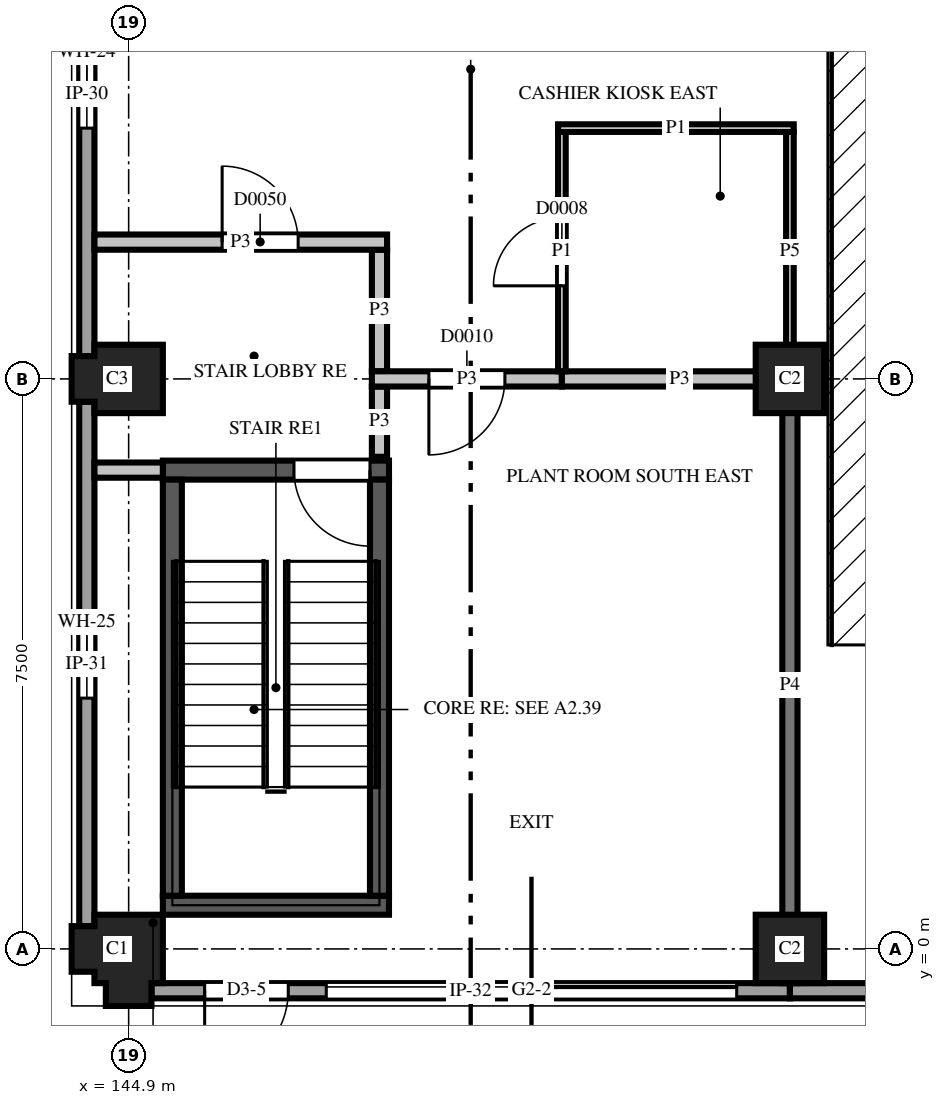
"""IFC4 building model, lengths in metres.
Left out: names, types, materials, properties, quantities, classifications, styles, units other than length and angle.
Written with IfcOpenShell. Run it as: python <this file> out.ifc"""

import sys

from ifc_helpers import new_model, si_unit, direction, frame, frame_2d, origin, place, context, subcontext, project, spatial, polyline, rectangle, outline, extrude, element, fill, save


model = new_model("IFC4")
c1 = context("Model", 3, precision=1e-05, world=origin(), true_north=direction((0.0, 1.0)))
c2 = subcontext(c1, "Body", "Model", "MODEL_VIEW")
j1 = project(units=[si_unit("LENGTHUNIT", "METRE"), si_unit("PLANEANGLEUNIT", "RADIAN")], contexts=[c1])
p1 = place(None, origin())
s1 = spatial("IfcSite", under=j1, at=p1, CompositionType="ELEMENT")
p2 = place(p1, origin())
s2 = spatial("IfcBuilding", under=s1, at=p2, CompositionType="ELEMENT")
p3 = place(p2, origin())
s3 = spatial("IfcBuildingStorey", under=s2, at=p3, CompositionType="ELEMENT", Elevation=0.0)
p4 = place(p3, frame((144.9, 0.0, 0.0), z_axis=(0.0, 0.0, 1.0), x_axis=(-1.0, 0.0, 0.0)))
e1 = element("IfcColumn", 1, at=p4, inside=s3, PredefinedType="COLUMN", context=c2, shape_type="SweptSolid", body=[
    extrude(outline(polyline([(-0.45, -0.45), (0.45, -0.45), (0.45, -0.3), (0.75, -0.3), (0.75, 0.3), (0.45, 0.3), (0.45, 0.45), (0.3, 0.45), (0.3, 0.75), (-0.3, 0.75), (-0.3, 0.45), (-0.45, 0.45), (-0.45, -0.45)])), origin(), (0.0, 0.0, 1.0), 4.5),
])
p5 = place(p3, frame((153.6, 0.0, 0.0), z_axis=(0.0, 0.0, 1.0), x_axis=(1.0, 0.0, 0.0)))
e2 = element("IfcColumn", 2, at=p5, inside=s3, PredefinedType="COLUMN", context=c2, shape_type="SweptSolid", body=[
    extrude(outline(polyline([(-0.45, -0.45), (0.45, -0.45), (0.45, 0.45), (-0.45, 0.45), (-0.45, -0.45)])), origin(), (0.0, 0.0, 1.0), 4.5),
])
p6 = place(p3, frame((144.9, 7.5, 0.0), z_axis=(0.0, 0.0, 1.0), x_axis=(-1.0, 0.0, 0.0)))
e3 = element("IfcColumn", 3, at=p6, inside=s3, PredefinedType="COLUMN", context=c2, shape_type="SweptSolid", body=[
    extrude(outline(polyline([(-0.45, -0.45), (0.45, -0.45), (0.45, -0.3), (0.75, -0.3), (0.75, 0.3), (0.45, 0.3), (0.45, 0.45), (-0.45, 0.45), (-0.45, -0.45)])), origin(), (0.0, 0.0, 1.0), 4.5),
])
p7 = place(p3, frame((153.6, 7.5, 0.0), z_axis=(0.0, 0.0, 1.0), x_axis=(1.0, 0.0, 0.0)))
e4 = element("IfcColumn", 4, at=p7, inside=s3, PredefinedType="COLUMN", context=c2, shape_type="SweptSolid", body=[
    extrude(outline(polyline([(-0.45, -0.45), (0.45, -0.45), (0.45, 0.45), (-0.45, 0.45), (-0.45, -0.45)])), origin(), (0.0, 0.0, 1.0), 4.5),
])
p8 = place(p3, frame((145.35, 0.575, 0.0), z_axis=(0.0, 0.0, 1.0), x_axis=(1.0, 0.0, 0.0)))
e5 = element("IfcWall", 5, at=p8, inside=s3, PredefinedType="SHEAR", context=c2, shape_type="SweptSolid", body=[
    extrude(rectangle(XDim=2.975, YDim=0.25, at=frame_2d((1.487, 0.0))), origin(), (0.0, 0.0, 1.0), 4.5),
])
p9 = place(p3, frame((145.35, 6.3, 0.0), z_axis=(0.0, 0.0, 1.0), x_axis=(1.0, 0.0, 0.0)))
e6 = element("IfcWall", 6, at=p9, inside=s3, PredefinedType="SHEAR", context=c2, shape_type="SweptSolid", body=[
    extrude(rectangle(XDim=2.975, YDim=0.25, at=frame_2d((1.487, 0.0))), origin(), (0.0, 0.0, 1.0), 4.5),
])
p10 = place(p9, frame((1.725, 0.0, 0.0)))
e7 = element("IfcOpeningElement", 7, at=p10, cuts=e6, PredefinedType="OPENING", context=c2, shape_type="SweptSolid", body=[
    extrude(rectangle(XDim=1.0, YDim=2.1, at=frame_2d((0.5, 1.05))), frame((0.0, 0.135, 0.0), z_axis=(0.0, -1.0, 0.0), x_axis=(1.0, 0.0, 0.0)), (0.0, 0.0, 1.0), 0.27),
])
for number, where, z_axis, x_axis in (
    (8, (145.475, 0.7, 0.0), (0.0, 0.0, 1.0), (0.0, 1.0, 0.0)),
    (9, (148.2, 0.7, 0.0), (0.0, 0.0, 1.0), (0.0, 1.0, 0.0)),
):
    element("IfcWall", number, at=place(p3, frame(where, z_axis=z_axis, x_axis=x_axis)), inside=s3, PredefinedType="SHEAR", context=c2, shape_type="SweptSolid", body=[
        extrude(rectangle(XDim=5.475, YDim=0.25, at=frame_2d((2.738, 0.0))), origin(), (0.0, 0.0, 1.0), 4.5),
    ])
p11 = place(p3, frame((144.35, 14.7, 0.0), z_axis=(0.0, 0.0, 1.0), x_axis=(0.0, -1.0, 0.0)))
e10 = element("IfcWall", 10, at=p11, inside=s3, PredefinedType="SOLIDWALL", context=c2, shape_type="SweptSolid", body=[
    extrude(outline(polyline([(0.0, 0.0), (6.9, 0.0), (6.9, 3.1), (6.002, 3.1), (6.0, 2.4), (5.681, 2.56), (5.363, 2.695), (5.044, 2.806), (4.725, 2.895), (4.406, 2.963), (4.087, 3.012), (3.769, 3.041), (3.45, 3.05), (3.131, 3.041), (2.812, 3.012), (2.494, 2.963), (2.175, 2.895), (1.856, 2.806), (1.538, 2.695), (1.219, 2.56), (0.9, 2.4), (0.898, 3.1), (0.0, 3.1), (0.0, 0.0)])), frame((0.0, 0.1, 0.0), z_axis=(0.0, -1.0, 0.0), x_axis=(1.0, 0.0, 0.0)), (0.0, 0.0, 1.0), 0.2),
])
p12 = place(p11, frame((3.0, 0.0, 2.4)))
e11 = element("IfcOpeningElement", 11, at=p12, cuts=e10, PredefinedType="OPENING", context=c2, shape_type="SweptSolid", body=[
    extrude(rectangle(XDim=0.9, YDim=0.531, at=frame_2d((0.45, 0.266))), frame((0.0, 0.11, 0.0), z_axis=(0.0, -1.0, 0.0), x_axis=(1.0, 0.0, 0.0)), (0.0, 0.0, 1.0), 0.22),
])
p13 = place(p3, frame((144.35, 7.2, 0.0), z_axis=(0.0, 0.0, 1.0), x_axis=(0.0, -1.0, 0.0)))
e12 = element("IfcWall", 12, at=p13, inside=s3, PredefinedType="SOLIDWALL", context=c2, shape_type="SweptSolid", body=[
    extrude(outline(polyline([(0.0, 0.0), (6.9, 0.0), (6.9, 3.1), (6.002, 3.1), (6.0, 2.4), (5.681, 2.56), (5.363, 2.695), (5.044, 2.806), (4.725, 2.895), (4.406, 2.963), (4.087, 3.012), (3.769, 3.041), (3.45, 3.05), (3.131, 3.041), (2.812, 3.012), (2.494, 2.963), (2.175, 2.895), (1.856, 2.806), (1.538, 2.695), (1.219, 2.56), (0.9, 2.4), (0.898, 3.1), (0.0, 3.1), (0.0, 0.0)])), frame((0.0, 0.1, 0.0), z_axis=(0.0, -1.0, 0.0), x_axis=(1.0, 0.0, 0.0)), (0.0, 0.0, 1.0), 0.2),
])
p14 = place(p13, frame((3.0, 0.0, 2.4)))
e13 = element("IfcOpeningElement", 13, at=p14, cuts=e12, PredefinedType="OPENING", context=c2, shape_type="SweptSolid", body=[
    extrude(rectangle(XDim=0.9, YDim=0.531, at=frame_2d((0.45, 0.266))), frame((0.0, 0.11, 0.0), z_axis=(0.0, -1.0, 0.0), x_axis=(1.0, 0.0, 0.0)), (0.0, 0.0, 1.0), 0.22),
])
p15 = place(p3, frame((145.2, -0.55, 0.0), z_axis=(0.0, 0.0, 1.0), x_axis=(1.0, 0.0, 0.0)))
e14 = element("IfcWall", 14, at=p15, inside=s3, PredefinedType="SOLIDWALL", context=c2, shape_type="SweptSolid", body=[
    extrude(outline(polyline([(0.0, 0.0), (8.4, 0.0), (8.4, 2.9), (8.102, 2.9), (8.1, 2.8), (7.613, 2.812), (7.125, 2.822), (6.637, 2.831), (6.15, 2.837), (5.663, 2.843), (5.175, 2.847), (4.688, 2.849), (4.2, 2.85), (3.712, 2.849), (3.225, 2.847), (2.738, 2.843), (2.25, 2.837), (1.762, 2.831), (1.275, 2.822), (0.788, 2.812), (0.3, 2.8), (0.298, 2.9), (0.0, 2.9), (0.0, 0.0)])), frame((0.0, 0.1, 0.0), z_axis=(0.0, -1.0, 0.0), x_axis=(1.0, 0.0, 0.0)), (0.0, 0.0, 1.0), 0.2),
])
p16 = place(p15, frame((2.3, 0.0, 0.0)))
e15 = element("IfcOpeningElement", 15, at=p16, cuts=e14, PredefinedType="OPENING", context=c2, shape_type="SweptSolid", body=[
    extrude(rectangle(XDim=5.4, YDim=2.65, at=frame_2d((2.7, 1.325))), frame((0.0, 0.11, 0.0), z_axis=(0.0, -1.0, 0.0), x_axis=(1.0, 0.0, 0.0)), (0.0, 0.0, 1.0), 0.22),
])
p17 = place(p15, frame((0.7, 0.0, 0.0)))
e16 = element("IfcOpeningElement", 16, at=p17, cuts=e14, PredefinedType="OPENING", context=c2, shape_type="SweptSolid", body=[
    extrude(rectangle(XDim=1.1, YDim=2.1, at=frame_2d((0.55, 1.05))), frame((0.0, 0.11, 0.0), z_axis=(0.0, -1.0, 0.0), x_axis=(1.0, 0.0, 0.0)), (0.0, 0.0, 1.0), 0.22),
])
p18 = place(p3, frame((153.6, -0.55, 0.0), z_axis=(0.0, 0.0, 1.0), x_axis=(1.0, 0.0, 0.0)))
e17 = element("IfcWall", 17, at=p18, inside=s3, PredefinedType="SOLIDWALL", context=c2, shape_type="SweptSolid", body=[
    extrude(outline(polyline([(0.0, 0.0), (8.4, 0.0), (8.4, 2.9), (7.502, 2.9), (7.5, 2.8), (7.087, 2.812), (6.675, 2.822), (6.262, 2.831), (5.85, 2.837), (5.438, 2.843), (5.025, 2.847), (4.613, 2.849), (4.2, 2.85), (3.788, 2.849), (3.375, 2.847), (2.962, 2.843), (2.55, 2.837), (2.137, 2.831), (1.725, 2.822), (1.312, 2.812), (0.9, 2.8), (0.898, 2.9), (0.0, 2.9), (0.0, 0.0)])), frame((0.0, 0.1, 0.0), z_axis=(0.0, -1.0, 0.0), x_axis=(1.0, 0.0, 0.0)), (0.0, 0.0, 1.0), 0.2),
])
p19 = place(p18, frame((1.2, 0.0, 0.0)))
e18 = element("IfcOpeningElement", 18, at=p19, cuts=e17, PredefinedType="OPENING", context=c2, shape_type="SweptSolid", body=[
    extrude(rectangle(XDim=6.0, YDim=2.65, at=frame_2d((3.0, 1.325))), frame((0.0, 0.11, 0.0), z_axis=(0.0, -1.0, 0.0), x_axis=(1.0, 0.0, 0.0)), (0.0, 0.0, 1.0), 0.22),
])
p20 = place(p3, frame((153.6, -0.45, 0.0), z_axis=(0.0, 0.0, 1.0), x_axis=(0.0, 1.0, 0.0)))
e19 = element("IfcWall", 19, at=p20, inside=s3, PredefinedType="PARTITIONING", context=c2, shape_type="SweptSolid", body=[
    extrude(rectangle(XDim=7.85, YDim=0.2, at=frame_2d((3.925, 0.0))), origin(), (0.0, 0.0, 1.0), 3.4),
])
p21 = place(p3, frame((144.45, 6.3, 0.0), z_axis=(0.0, 0.0, 1.0), x_axis=(1.0, 0.0, 0.0)))
e20 = element("IfcWall", 20, at=p21, inside=s3, PredefinedType="PARTITIONING", context=c2, shape_type="SweptSolid", body=[
    extrude(rectangle(XDim=0.9, YDim=0.2, at=frame_2d((0.45, 0.0))), origin(), (0.0, 0.0, 1.0), 3.68),
])
p22 = place(p3, frame((148.2, 6.475, 0.0), z_axis=(0.0, 0.0, 1.0), x_axis=(0.0, 1.0, 0.0)))
e21 = element("IfcWall", 21, at=p22, inside=s3, PredefinedType="PARTITIONING", context=c2, shape_type="SweptSolid", body=[
    extrude(rectangle(XDim=0.925, YDim=0.2, at=frame_2d((0.462, 0.0))), origin(), (0.0, 0.0, 1.0), 3.68),
])
p23 = place(p3, frame((148.2, 7.6, 0.0), z_axis=(0.0, 0.0, 1.0), x_axis=(0.0, 1.0, 0.0)))
e22 = element("IfcWall", 22, at=p23, inside=s3, PredefinedType="PARTITIONING", context=c2, shape_type="SweptSolid", body=[
    extrude(rectangle(XDim=1.6, YDim=0.2, at=frame_2d((0.8, 0.0))), origin(), (0.0, 0.0, 1.0), 3.68),
])
p24 = place(p3, frame((150.6, 7.5, 0.0), z_axis=(0.0, 0.0, 1.0), x_axis=(-1.0, 0.0, 0.0)))
e23 = element("IfcWall", 23, at=p24, inside=s3, PredefinedType="PARTITIONING", context=c2, shape_type="SweptSolid", body=[
    extrude(rectangle(XDim=2.5, YDim=0.2, at=frame_2d((1.25, 0.0))), origin(), (0.0, 0.0, 1.0), 3.68),
])
p25 = place(p24, frame((0.75, 0.0, 0.0)))
e24 = element("IfcOpeningElement", 24, at=p25, cuts=e23, PredefinedType="OPENING", context=c2, shape_type="SweptSolid", body=[
    extrude(rectangle(XDim=1.0, YDim=2.1, at=frame_2d((0.5, 1.05))), frame((0.0, 0.11, 0.0), z_axis=(0.0, -1.0, 0.0), x_axis=(1.0, 0.0, 0.0)), (0.0, 0.0, 1.0), 0.22),
])
p26 = place(p3, frame((150.6, 7.5, 0.0), z_axis=(0.0, 0.0, 1.0), x_axis=(1.0, 0.0, 0.0)))
e25 = element("IfcWall", 25, at=p26, inside=s3, PredefinedType="PARTITIONING", context=c2, shape_type="SweptSolid", body=[
    extrude(rectangle(XDim=3.1, YDim=0.2, at=frame_2d((1.55, 0.0))), origin(), (0.0, 0.0, 1.0), 3.68),
])
p27 = place(p3, frame((153.6, 7.6, 0.0), z_axis=(0.0, 0.0, 1.0), x_axis=(0.0, 1.0, 0.0)))
e26 = element("IfcWall", 26, at=p27, inside=s3, PredefinedType="PARTITIONING", context=c2, shape_type="SweptSolid", body=[
    extrude(rectangle(XDim=3.15, YDim=0.1, at=frame_2d((1.575, 0.0))), origin(), (0.0, 0.0, 1.0), 3.4),
])
p28 = place(p3, frame((148.3, 9.3, 0.0), z_axis=(0.0, 0.0, 1.0), x_axis=(-1.0, 0.0, 0.0)))
e27 = element("IfcWall", 27, at=p28, inside=s3, PredefinedType="PARTITIONING", context=c2, shape_type="SweptSolid", body=[
    extrude(rectangle(XDim=3.85, YDim=0.2, at=frame_2d((1.925, 0.0))), origin(), (0.0, 0.0, 1.0), 3.68),
])
p29 = place(p28, frame((1.17, 0.0, 0.0)))
e28 = element("IfcOpeningElement", 28, at=p29, cuts=e27, PredefinedType="OPENING", context=c2, shape_type="SweptSolid", body=[
    extrude(rectangle(XDim=1.0, YDim=2.1, at=frame_2d((0.5, 1.05))), frame((0.0, 0.11, 0.0), z_axis=(0.0, -1.0, 0.0), x_axis=(1.0, 0.0, 0.0)), (0.0, 0.0, 1.0), 0.22),
])
p30 = place(p3, frame((150.6, 10.75, 0.0), z_axis=(0.0, 0.0, 1.0), x_axis=(0.0, -1.0, 0.0)))
e29 = element("IfcWall", 29, at=p30, inside=s3, PredefinedType="PARTITIONING", context=c2, shape_type="SweptSolid", body=[
    extrude(rectangle(XDim=3.15, YDim=0.1, at=frame_2d((1.575, 0.0))), origin(), (0.0, 0.0, 1.0), 3.68),
])
p31 = place(p30, frame((1.125, 0.0, 0.0)))
e30 = element("IfcOpeningElement", 30, at=p31, cuts=e29, PredefinedType="OPENING", context=c2, shape_type="SweptSolid", body=[
    extrude(rectangle(XDim=0.9, YDim=2.1, at=frame_2d((0.45, 1.05))), frame((0.0, 0.06, 0.0), z_axis=(0.0, -1.0, 0.0), x_axis=(1.0, 0.0, 0.0)), (0.0, 0.0, 1.0), 0.12),
])
p32 = place(p3, frame((153.65, 10.8, 0.0), z_axis=(0.0, 0.0, 1.0), x_axis=(-1.0, 0.0, 0.0)))
e31 = element("IfcWall", 31, at=p32, inside=s3, PredefinedType="PARTITIONING", context=c2, shape_type="SweptSolid", body=[
    extrude(rectangle(XDim=3.1, YDim=0.1, at=frame_2d((1.55, 0.0))), origin(), (0.0, 0.0, 1.0), 3.68),
])
p33 = place(p12, origin())
e32 = element("IfcWindow", 32, at=p33, inside=s3, PartitioningType="SINGLE_PANEL", PredefinedType="WINDOW", context=c2, shape_type="SweptSolid", body=[
    extrude(rectangle(XDim=0.9, YDim=0.531, at=frame_2d((0.45, 0.266))), frame((0.0, 0.03, 0.0), z_axis=(0.0, -1.0, 0.0), x_axis=(1.0, 0.0, 0.0)), (0.0, 0.0, 1.0), 0.06),
])
fill(e11, e32)
p34 = place(p14, origin())
e33 = element("IfcWindow", 33, at=p34, inside=s3, PartitioningType="SINGLE_PANEL", PredefinedType="WINDOW", context=c2, shape_type="SweptSolid", body=[
    extrude(rectangle(XDim=0.9, YDim=0.531, at=frame_2d((0.45, 0.266))), frame((0.0, 0.03, 0.0), z_axis=(0.0, -1.0, 0.0), x_axis=(1.0, 0.0, 0.0)), (0.0, 0.0, 1.0), 0.06),
])
fill(e13, e33)
p35 = place(p16, frame((5.4, 0.0, 0.0), z_axis=(0.0, 0.0, 1.0), x_axis=(-1.0, 0.0, 0.0)))
e34 = element("IfcDoor", 34, at=p35, inside=s3, OperationType="SINGLE_SWING_LEFT", PredefinedType="GATE", context=c2, shape_type="SweptSolid", body=[
    extrude(rectangle(XDim=5.4, YDim=2.65, at=frame_2d((2.7, 1.325))), frame((0.0, 0.025, 0.0), z_axis=(0.0, -1.0, 0.0), x_axis=(1.0, 0.0, 0.0)), (0.0, 0.0, 1.0), 0.05),
])
fill(e15, e34)
p36 = place(p17, frame((1.1, 0.0, 0.0), z_axis=(0.0, 0.0, 1.0), x_axis=(-1.0, 0.0, 0.0)))
e35 = element("IfcDoor", 35, at=p36, inside=s3, OperationType="SINGLE_SWING_LEFT", PredefinedType="DOOR", context=c2, shape_type="SweptSolid", body=[
    extrude(rectangle(XDim=1.1, YDim=2.1, at=frame_2d((0.55, 1.05))), frame((0.0, 0.025, 0.0), z_axis=(0.0, -1.0, 0.0), x_axis=(1.0, 0.0, 0.0)), (0.0, 0.0, 1.0), 0.05),
])
fill(e16, e35)
p37 = place(p31, origin())
e36 = element("IfcDoor", 36, at=p37, inside=s3, OperationType="SINGLE_SWING_RIGHT", PredefinedType="DOOR", context=c2, shape_type="SweptSolid", body=[
    extrude(rectangle(XDim=0.9, YDim=2.1, at=frame_2d((0.45, 1.05))), frame((0.0, 0.025, 0.0), z_axis=(0.0, -1.0, 0.0), x_axis=(1.0, 0.0, 0.0)), (0.0, 0.0, 1.0), 0.05),
])
fill(e30, e36)
p38 = place(p25, origin())
e37 = element("IfcDoor", 37, at=p38, inside=s3, OperationType="SINGLE_SWING_LEFT", PredefinedType="DOOR", context=c2, shape_type="SweptSolid", body=[
    extrude(rectangle(XDim=1.0, YDim=2.1, at=frame_2d((0.5, 1.05))), frame((0.0, 0.025, 0.0), z_axis=(0.0, -1.0, 0.0), x_axis=(1.0, 0.0, 0.0)), (0.0, 0.0, 1.0), 0.05),
])
fill(e24, e37)
p39 = place(p29, origin())
e38 = element("IfcDoor", 38, at=p39, inside=s3, OperationType="SINGLE_SWING_RIGHT", PredefinedType="DOOR", context=c2, shape_type="SweptSolid", body=[
    extrude(rectangle(XDim=1.0, YDim=2.1, at=frame_2d((0.5, 1.05))), frame((0.0, 0.025, 0.0), z_axis=(0.0, -1.0, 0.0), x_axis=(1.0, 0.0, 0.0)), (0.0, 0.0, 1.0), 0.05),
])
fill(e28, e38)
p40 = place(p10, origin())
e39 = element("IfcDoor", 39, at=p40, inside=s3, OperationType="SINGLE_SWING_RIGHT", PredefinedType="DOOR", context=c2, shape_type="SweptSolid", body=[
    extrude(rectangle(XDim=1.0, YDim=2.1, at=frame_2d((0.5, 1.05))), frame((0.0, 0.025, 0.0), z_axis=(0.0, -1.0, 0.0), x_axis=(1.0, 0.0, 0.0)), (0.0, 0.0, 1.0), 0.05),
])
fill(e7, e39)
save(model, sys.argv[1])
